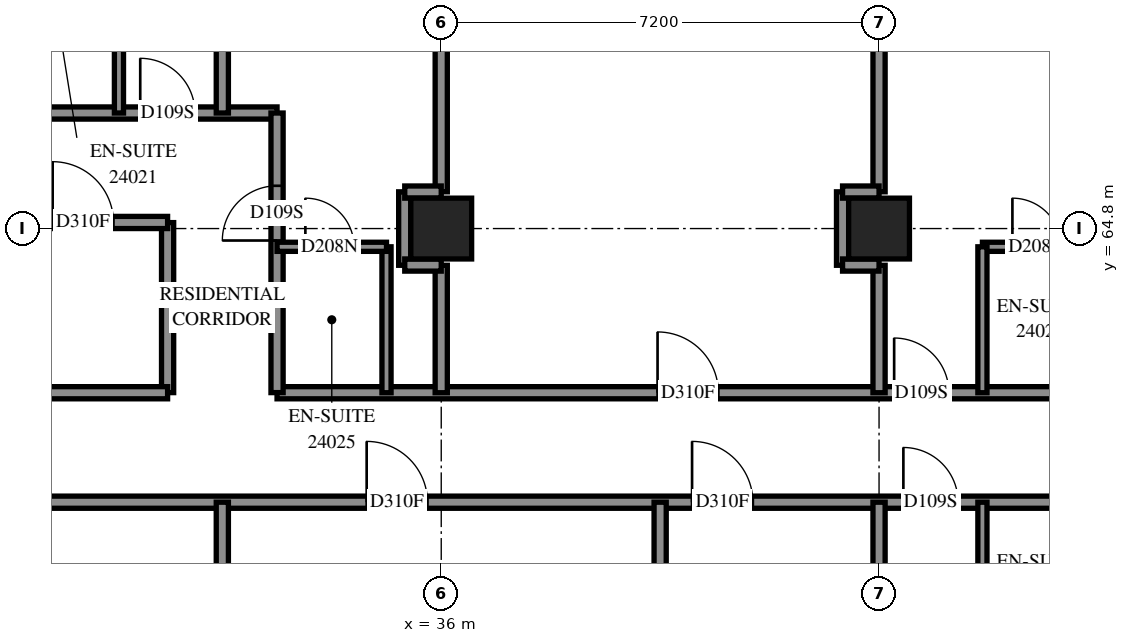
"""IFC4 building model, lengths in metres.
Left out: names, types, materials, properties, quantities, classifications, styles, units other than length and angle.
Written with IfcOpenShell. Run it as: python <this file> out.ifc"""

import sys

from ifc_helpers import new_model, si_unit, direction, frame, frame_2d, origin, origin_2d, place, context, subcontext, project, spatial, rectangle, extrude, element, fill, save


model = new_model("IFC4")
c1 = context("Model", 3, precision=1e-05, world=origin(), true_north=direction((0.0, 1.0)))
c2 = subcontext(c1, "Body", "Model", "MODEL_VIEW")
j1 = project(units=[si_unit("LENGTHUNIT", "METRE"), si_unit("PLANEANGLEUNIT", "RADIAN")], contexts=[c1])
p1 = place(None, origin())
s1 = spatial("IfcSite", under=j1, at=p1, CompositionType="ELEMENT")
p2 = place(p1, origin())
s2 = spatial("IfcBuilding", under=s1, at=p2, CompositionType="ELEMENT")
p3 = place(p2, frame((0.0, 0.0, 91.4)))
s3 = spatial("IfcBuildingStorey", under=s2, at=p3, CompositionType="ELEMENT", Elevation=91.4)
for number, where, z_axis, x_axis in (
    (1, (36.0, 64.8, 0.0), (0.0, 0.0, 1.0), (1.0, 0.0, 0.0)),
    (2, (43.2, 64.8, 0.0), (0.0, 0.0, 1.0), (1.0, 0.0, 0.0)),
):
    element("IfcColumn", number, at=place(p3, frame(where, z_axis=z_axis, x_axis=x_axis)), inside=s3, PredefinedType="COLUMN", context=c2, shape_type="SweptSolid", body=[
        extrude(rectangle(XDim=1.0, YDim=1.0, at=origin_2d()), origin(), (0.0, 0.0, 1.0), 3.1),
    ])
p4 = place(p3, frame((28.802, 60.3, 0.0), z_axis=(0.0, 0.0, 1.0), x_axis=(1.0, 0.0, 0.0)))
e3 = element("IfcWall", 3, at=p4, inside=s3, PredefinedType="PARTITIONING", context=c2, shape_type="SweptSolid", body=[
    extrude(rectangle(XDim=24.298, YDim=0.2, at=frame_2d((12.149, 0.0))), origin(), (0.0, 0.0, 1.0), 3.1),
])
p5 = place(p4, frame((5.972, 0.0, 0.0)))
e4 = element("IfcOpeningElement", 4, at=p5, cuts=e3, PredefinedType="OPENING", context=c2, shape_type="SweptSolid", body=[
    extrude(rectangle(XDim=1.0, YDim=2.1, at=frame_2d((0.5, 1.05))), frame((0.0, 0.11, 0.0), z_axis=(0.0, -1.0, 0.0), x_axis=(1.0, 0.0, 0.0)), (0.0, 0.0, 1.0), 0.22),
])
p6 = place(p4, frame((11.323, 0.0, 0.0)))
e5 = element("IfcOpeningElement", 5, at=p6, cuts=e3, PredefinedType="OPENING", context=c2, shape_type="SweptSolid", body=[
    extrude(rectangle(XDim=1.0, YDim=2.1, at=frame_2d((0.5, 1.05))), frame((0.0, 0.11, 0.0), z_axis=(0.0, -1.0, 0.0), x_axis=(1.0, 0.0, 0.0)), (0.0, 0.0, 1.0), 0.22),
])
p7 = place(p4, frame((14.798, 0.0, 0.0)))
e6 = element("IfcOpeningElement", 6, at=p7, cuts=e3, PredefinedType="OPENING", context=c2, shape_type="SweptSolid", body=[
    extrude(rectangle(XDim=0.9, YDim=2.1, at=frame_2d((0.45, 1.05))), frame((0.0, 0.11, 0.0), z_axis=(0.0, -1.0, 0.0), x_axis=(1.0, 0.0, 0.0)), (0.0, 0.0, 1.0), 0.22),
])
p8 = place(p4, frame((18.833, 0.0, 0.0)))
e7 = element("IfcOpeningElement", 7, at=p8, cuts=e3, PredefinedType="OPENING", context=c2, shape_type="SweptSolid", body=[
    extrude(rectangle(XDim=1.0, YDim=2.1, at=frame_2d((0.5, 1.05))), frame((0.0, 0.11, 0.0), z_axis=(0.0, -1.0, 0.0), x_axis=(1.0, 0.0, 0.0)), (0.0, 0.0, 1.0), 0.22),
])
p9 = place(p4, frame((23.151, 0.0, 0.0)))
e8 = element("IfcOpeningElement", 8, at=p9, cuts=e3, PredefinedType="OPENING", context=c2, shape_type="SweptSolid", body=[
    extrude(rectangle(XDim=1.0, YDim=2.1, at=frame_2d((0.5, 1.05))), frame((0.0, 0.11, 0.0), z_axis=(0.0, -1.0, 0.0), x_axis=(1.0, 0.0, 0.0)), (0.0, 0.0, 1.0), 0.22),
])
p10 = place(p3, frame((33.3, 62.1, 0.0), z_axis=(0.0, 0.0, 1.0), x_axis=(1.0, 0.0, 0.0)))
e9 = element("IfcWall", 9, at=p10, inside=s3, PredefinedType="PARTITIONING", context=c2, shape_type="SweptSolid", body=[
    extrude(rectangle(XDim=17.1, YDim=0.2, at=frame_2d((8.55, 0.0))), origin(), (0.0, 0.0, 1.0), 3.1),
])
p11 = place(p10, frame((6.258, 0.0, 0.0)))
e10 = element("IfcOpeningElement", 10, at=p11, cuts=e9, PredefinedType="OPENING", context=c2, shape_type="SweptSolid", body=[
    extrude(rectangle(XDim=1.0, YDim=2.1, at=frame_2d((0.5, 1.05))), frame((0.0, 0.11, 0.0), z_axis=(0.0, -1.0, 0.0), x_axis=(1.0, 0.0, 0.0)), (0.0, 0.0, 1.0), 0.22),
])
p12 = place(p10, frame((10.148, 0.0, 0.0)))
e11 = element("IfcOpeningElement", 11, at=p12, cuts=e9, PredefinedType="OPENING", context=c2, shape_type="SweptSolid", body=[
    extrude(rectangle(XDim=0.9, YDim=2.1, at=frame_2d((0.45, 1.05))), frame((0.0, 0.11, 0.0), z_axis=(0.0, -1.0, 0.0), x_axis=(1.0, 0.0, 0.0)), (0.0, 0.0, 1.0), 0.22),
])
p13 = place(p10, frame((15.729, 0.0, 0.0)))
e12 = element("IfcOpeningElement", 12, at=p13, cuts=e9, PredefinedType="OPENING", context=c2, shape_type="SweptSolid", body=[
    extrude(rectangle(XDim=0.9, YDim=2.1, at=frame_2d((0.45, 1.05))), frame((0.0, 0.11, 0.0), z_axis=(0.0, -1.0, 0.0), x_axis=(1.0, 0.0, 0.0)), (0.0, 0.0, 1.0), 0.22),
])
p14 = place(p3, frame((21.602, 66.7, 0.0), z_axis=(0.0, 0.0, 1.0), x_axis=(1.0, 0.0, 0.0)))
e13 = element("IfcWall", 13, at=p14, inside=s3, PredefinedType="PARTITIONING", context=c2, shape_type="SweptSolid", body=[
    extrude(rectangle(XDim=11.698, YDim=0.2, at=frame_2d((5.849, 0.0))), origin(), (0.0, 0.0, 1.0), 3.1),
])
p15 = place(p14, frame((1.79, 0.0, 0.0)))
e14 = element("IfcOpeningElement", 14, at=p15, cuts=e13, PredefinedType="OPENING", context=c2, shape_type="SweptSolid", body=[
    extrude(rectangle(XDim=1.0, YDim=2.1, at=frame_2d((0.5, 1.05))), frame((0.0, 0.11, 0.0), z_axis=(0.0, -1.0, 0.0), x_axis=(1.0, 0.0, 0.0)), (0.0, 0.0, 1.0), 0.22),
])
p16 = place(p14, frame((3.998, 0.0, 0.0)))
e15 = element("IfcOpeningElement", 15, at=p16, cuts=e13, PredefinedType="OPENING", context=c2, shape_type="SweptSolid", body=[
    extrude(rectangle(XDim=0.9, YDim=2.1, at=frame_2d((0.45, 1.05))), frame((0.0, 0.11, 0.0), z_axis=(0.0, -1.0, 0.0), x_axis=(1.0, 0.0, 0.0)), (0.0, 0.0, 1.0), 0.22),
])
p17 = place(p14, frame((9.448, 0.0, 0.0)))
e16 = element("IfcOpeningElement", 16, at=p17, cuts=e13, PredefinedType="OPENING", context=c2, shape_type="SweptSolid", body=[
    extrude(rectangle(XDim=0.9, YDim=2.1, at=frame_2d((0.45, 1.05))), frame((0.0, 0.11, 0.0), z_axis=(0.0, -1.0, 0.0), x_axis=(1.0, 0.0, 0.0)), (0.0, 0.0, 1.0), 0.22),
])
p18 = place(p3, frame((32.4, 66.7, 0.0), z_axis=(0.0, 0.0, 1.0), x_axis=(0.0, 1.0, 0.0)))
e17 = element("IfcWall", 17, at=p18, inside=s3, PredefinedType="PARTITIONING", context=c2, shape_type="SweptSolid", body=[
    extrude(rectangle(XDim=6.113, YDim=0.2, at=frame_2d((3.057, 0.0))), origin(), (0.0, 0.0, 1.0), 3.1),
])
for number, where, z_axis, x_axis in (
    (18, (36.0, 65.404, 0.0), (0.0, 0.0, 1.0), (0.0, 1.0, 0.0)),
    (19, (43.2, 65.404, 0.0), (0.0, 0.0, 1.0), (0.0, 1.0, 0.0)),
):
    element("IfcWall", number, at=place(p3, frame(where, z_axis=z_axis, x_axis=x_axis)), inside=s3, PredefinedType="PARTITIONING", context=c2, shape_type="SweptSolid", body=[
        extrude(rectangle(XDim=5.992, YDim=0.2, at=frame_2d((2.996, 0.0))), origin(), (0.0, 0.0, 1.0), 3.1),
    ])
p19 = place(p3, frame((33.3, 62.102, 0.0), z_axis=(0.0, 0.0, 1.0), x_axis=(0.0, 1.0, 0.0)))
e20 = element("IfcWall", 20, at=p19, inside=s3, PredefinedType="PARTITIONING", context=c2, shape_type="SweptSolid", body=[
    extrude(rectangle(XDim=4.598, YDim=0.2, at=frame_2d((2.299, 0.0))), origin(), (0.0, 0.0, 1.0), 3.1),
])
p20 = place(p19, frame((2.501, 0.0, 0.0)))
e21 = element("IfcOpeningElement", 21, at=p20, cuts=e20, PredefinedType="OPENING", context=c2, shape_type="SweptSolid", body=[
    extrude(rectangle(XDim=0.9, YDim=2.1, at=frame_2d((0.45, 1.05))), frame((0.0, 0.11, 0.0), z_axis=(0.0, -1.0, 0.0), x_axis=(1.0, 0.0, 0.0)), (0.0, 0.0, 1.0), 0.22),
])
for number, where, z_axis, x_axis in (
    (22, (32.4, 55.959, 0.0), (0.0, 0.0, 1.0), (0.0, 1.0, 0.0)),
    (23, (39.6, 55.959, 0.0), (0.0, 0.0, 1.0), (0.0, 1.0, 0.0)),
):
    element("IfcWall", number, at=place(p3, frame(where, z_axis=z_axis, x_axis=x_axis)), inside=s3, PredefinedType="PARTITIONING", context=c2, shape_type="SweptSolid", body=[
        extrude(rectangle(XDim=4.341, YDim=0.2, at=frame_2d((2.171, 0.0))), origin(), (0.0, 0.0, 1.0), 3.1),
    ])
p21 = place(p3, frame((44.9, 64.5, 0.0), z_axis=(0.0, 0.0, 1.0), x_axis=(1.0, 0.0, 0.0)))
e24 = element("IfcWall", 24, at=p21, inside=s3, PredefinedType="PARTITIONING", context=c2, shape_type="SweptSolid", body=[
    extrude(rectangle(XDim=3.8, YDim=0.15, at=frame_2d((1.9, 0.0))), origin(), (0.0, 0.0, 1.0), 3.1),
])
p22 = place(p21, frame((0.493, 0.0, 0.0)))
e25 = element("IfcOpeningElement", 25, at=p22, cuts=e24, PredefinedType="OPENING", context=c2, shape_type="SweptSolid", body=[
    extrude(rectangle(XDim=0.8, YDim=2.1, at=frame_2d((0.4, 1.05))), frame((0.0, 0.085, 0.0), z_axis=(0.0, -1.0, 0.0), x_axis=(1.0, 0.0, 0.0)), (0.0, 0.0, 1.0), 0.17),
])
p23 = place(p21, frame((2.507, 0.0, 0.0)))
e26 = element("IfcOpeningElement", 26, at=p23, cuts=e24, PredefinedType="OPENING", context=c2, shape_type="SweptSolid", body=[
    extrude(rectangle(XDim=0.8, YDim=2.1, at=frame_2d((0.4, 1.05))), frame((0.0, 0.085, 0.0), z_axis=(0.0, -1.0, 0.0), x_axis=(1.0, 0.0, 0.0)), (0.0, 0.0, 1.0), 0.17),
])
p24 = place(p3, frame((31.5, 62.102, 0.0), z_axis=(0.0, 0.0, 1.0), x_axis=(0.0, 1.0, 0.0)))
e27 = element("IfcWall", 27, at=p24, inside=s3, PredefinedType="PARTITIONING", context=c2, shape_type="SweptSolid", body=[
    extrude(rectangle(XDim=2.796, YDim=0.2, at=frame_2d((1.398, 0.0))), origin(), (0.0, 0.0, 1.0), 3.1),
])
p25 = place(p3, frame((28.802, 62.1, 0.0), z_axis=(0.0, 0.0, 1.0), x_axis=(1.0, 0.0, 0.0)))
e28 = element("IfcWall", 28, at=p25, inside=s3, PredefinedType="PARTITIONING", context=c2, shape_type="SweptSolid", body=[
    extrude(rectangle(XDim=2.698, YDim=0.2, at=frame_2d((1.349, 0.0))), origin(), (0.0, 0.0, 1.0), 3.1),
])
for number, where, z_axis, x_axis in (
    (29, (35.1, 62.1, 0.0), (0.0, 0.0, 1.0), (0.0, 1.0, 0.0)),
    (30, (44.9, 57.9, 0.0), (0.0, 0.0, 1.0), (0.0, 1.0, 0.0)),
    (31, (44.9, 62.1, 0.0), (0.0, 0.0, 1.0), (0.0, 1.0, 0.0)),
    (32, (30.7, 66.7, 0.0), (0.0, 0.0, 1.0), (0.0, 1.0, 0.0)),
):
    element("IfcWall", number, at=place(p3, frame(where, z_axis=z_axis, x_axis=x_axis)), inside=s3, PredefinedType="PARTITIONING", context=c2, shape_type="SweptSolid", body=[
        extrude(rectangle(XDim=2.4, YDim=0.15, at=frame_2d((1.2, 0.0))), origin(), (0.0, 0.0, 1.0), 3.1),
    ])
p26 = place(p3, frame((29.3, 64.9, 0.0), z_axis=(0.0, 0.0, 1.0), x_axis=(1.0, 0.0, 0.0)))
e33 = element("IfcWall", 33, at=p26, inside=s3, PredefinedType="PARTITIONING", context=c2, shape_type="SweptSolid", body=[
    extrude(rectangle(XDim=2.2, YDim=0.2, at=frame_2d((1.1, 0.0))), origin(), (0.0, 0.0, 1.0), 3.1),
])
p27 = place(p26, frame((0.31, 0.0, 0.0)))
e34 = element("IfcOpeningElement", 34, at=p27, cuts=e33, PredefinedType="OPENING", context=c2, shape_type="SweptSolid", body=[
    extrude(rectangle(XDim=1.0, YDim=2.1, at=frame_2d((0.5, 1.05))), frame((0.0, 0.11, 0.0), z_axis=(0.0, -1.0, 0.0), x_axis=(1.0, 0.0, 0.0)), (0.0, 0.0, 1.0), 0.22),
])
p28 = place(p3, frame((43.2, 58.1, 0.0), z_axis=(0.0, 0.0, 1.0), x_axis=(0.0, 1.0, 0.0)))
e35 = element("IfcWall", 35, at=p28, inside=s3, PredefinedType="PARTITIONING", context=c2, shape_type="SweptSolid", body=[
    extrude(rectangle(XDim=2.2, YDim=0.2, at=frame_2d((1.1, 0.0))), origin(), (0.0, 0.0, 1.0), 3.1),
])
for number, where, z_axis, x_axis in (
    (36, (36.0, 62.1, 0.0), (0.0, 0.0, 1.0), (0.0, 1.0, 0.0)),
    (37, (43.2, 62.1, 0.0), (0.0, 0.0, 1.0), (0.0, 1.0, 0.0)),
):
    element("IfcWall", number, at=place(p3, frame(where, z_axis=z_axis, x_axis=x_axis)), inside=s3, PredefinedType="PARTITIONING", context=c2, shape_type="SweptSolid", body=[
        extrude(rectangle(XDim=2.096, YDim=0.2, at=frame_2d((1.048, 0.0))), origin(), (0.0, 0.0, 1.0), 3.1),
    ])
p29 = place(p3, frame((33.3, 64.5, 0.0), z_axis=(0.0, 0.0, 1.0), x_axis=(1.0, 0.0, 0.0)))
e38 = element("IfcWall", 38, at=p29, inside=s3, PredefinedType="PARTITIONING", context=c2, shape_type="SweptSolid", body=[
    extrude(rectangle(XDim=1.8, YDim=0.15, at=frame_2d((0.9, 0.0))), origin(), (0.0, 0.0, 1.0), 3.1),
])
p30 = place(p29, frame((0.466, 0.0, 0.0)))
e39 = element("IfcOpeningElement", 39, at=p30, cuts=e38, PredefinedType="OPENING", context=c2, shape_type="SweptSolid", body=[
    extrude(rectangle(XDim=0.8, YDim=2.1, at=frame_2d((0.4, 1.05))), frame((0.0, 0.085, 0.0), z_axis=(0.0, -1.0, 0.0), x_axis=(1.0, 0.0, 0.0)), (0.0, 0.0, 1.0), 0.17),
])
for number, where, z_axis, x_axis in (
    (40, (35.4, 64.196, 0.0), (0.0, 0.0, 1.0), (0.0, 1.0, 0.0)),
    (41, (42.6, 64.196, 0.0), (0.0, 0.0, 1.0), (0.0, 1.0, 0.0)),
):
    element("IfcWall", number, at=place(p3, frame(where, z_axis=z_axis, x_axis=x_axis)), inside=s3, PredefinedType="PARTITIONING", context=c2, shape_type="SweptSolid", body=[
        extrude(rectangle(XDim=1.208, YDim=0.2, at=frame_2d((0.604, 0.0))), origin(), (0.0, 0.0, 1.0), 3.1),
    ])
for number, where, z_axis, x_axis in (
    (42, (35.4, 65.4, 0.0), (0.0, 0.0, 1.0), (1.0, 0.0, 0.0)),
    (43, (42.6, 65.4, 0.0), (0.0, 0.0, 1.0), (1.0, 0.0, 0.0)),
    (44, (35.4, 64.2, 0.0), (0.0, 0.0, 1.0), (1.0, 0.0, 0.0)),
    (45, (42.6, 64.2, 0.0), (0.0, 0.0, 1.0), (1.0, 0.0, 0.0)),
):
    element("IfcWall", number, at=place(p3, frame(where, z_axis=z_axis, x_axis=x_axis)), inside=s3, PredefinedType="PARTITIONING", context=c2, shape_type="SweptSolid", body=[
        extrude(rectangle(XDim=0.6, YDim=0.2, at=frame_2d((0.3, 0.0))), origin(), (0.0, 0.0, 1.0), 3.1),
    ])
p31 = place(p17, origin())
e46 = element("IfcDoor", 46, at=p31, inside=s3, OperationType="SINGLE_SWING_RIGHT", PredefinedType="DOOR", context=c2, shape_type="SweptSolid", body=[
    extrude(rectangle(XDim=0.9, YDim=2.1, at=frame_2d((0.45, 1.05))), frame((0.0, 0.025, 0.0), z_axis=(0.0, -1.0, 0.0), x_axis=(1.0, 0.0, 0.0)), (0.0, 0.0, 1.0), 0.05),
])
fill(e16, e46)
p32 = place(p27, origin())
e47 = element("IfcDoor", 47, at=p32, inside=s3, OperationType="SINGLE_SWING_RIGHT", PredefinedType="DOOR", context=c2, shape_type="SweptSolid", body=[
    extrude(rectangle(XDim=1.0, YDim=2.1, at=frame_2d((0.5, 1.05))), frame((0.0, 0.025, 0.0), z_axis=(0.0, -1.0, 0.0), x_axis=(1.0, 0.0, 0.0)), (0.0, 0.0, 1.0), 0.05),
])
fill(e34, e47)
p33 = place(p5, origin())
e48 = element("IfcDoor", 48, at=p33, inside=s3, OperationType="SINGLE_SWING_RIGHT", PredefinedType="DOOR", context=c2, shape_type="SweptSolid", body=[
    extrude(rectangle(XDim=1.0, YDim=2.1, at=frame_2d((0.5, 1.05))), frame((0.0, 0.025, 0.0), z_axis=(0.0, -1.0, 0.0), x_axis=(1.0, 0.0, 0.0)), (0.0, 0.0, 1.0), 0.05),
])
fill(e4, e48)
p34 = place(p20, origin())
e49 = element("IfcDoor", 49, at=p34, inside=s3, OperationType="SINGLE_SWING_LEFT", PredefinedType="DOOR", context=c2, shape_type="SweptSolid", body=[
    extrude(rectangle(XDim=0.9, YDim=2.1, at=frame_2d((0.45, 1.05))), frame((0.0, 0.025, 0.0), z_axis=(0.0, -1.0, 0.0), x_axis=(1.0, 0.0, 0.0)), (0.0, 0.0, 1.0), 0.05),
])
fill(e21, e49)
p35 = place(p30, origin())
e50 = element("IfcDoor", 50, at=p35, inside=s3, OperationType="SINGLE_SWING_RIGHT", PredefinedType="DOOR", context=c2, shape_type="SweptSolid", body=[
    extrude(rectangle(XDim=0.8, YDim=2.1, at=frame_2d((0.4, 1.05))), frame((0.0, 0.025, 0.0), z_axis=(0.0, -1.0, 0.0), x_axis=(1.0, 0.0, 0.0)), (0.0, 0.0, 1.0), 0.05),
])
fill(e39, e50)
p36 = place(p11, origin())
e51 = element("IfcDoor", 51, at=p36, inside=s3, OperationType="SINGLE_SWING_RIGHT", PredefinedType="DOOR", context=c2, shape_type="SweptSolid", body=[
    extrude(rectangle(XDim=1.0, YDim=2.1, at=frame_2d((0.5, 1.05))), frame((0.0, 0.025, 0.0), z_axis=(0.0, -1.0, 0.0), x_axis=(1.0, 0.0, 0.0)), (0.0, 0.0, 1.0), 0.05),
])
fill(e10, e51)
p37 = place(p12, origin())
e52 = element("IfcDoor", 52, at=p37, inside=s3, OperationType="SINGLE_SWING_RIGHT", PredefinedType="DOOR", context=c2, shape_type="SweptSolid", body=[
    extrude(rectangle(XDim=0.9, YDim=2.1, at=frame_2d((0.45, 1.05))), frame((0.0, 0.025, 0.0), z_axis=(0.0, -1.0, 0.0), x_axis=(1.0, 0.0, 0.0)), (0.0, 0.0, 1.0), 0.05),
])
fill(e11, e52)
p38 = place(p22, origin())
e53 = element("IfcDoor", 53, at=p38, inside=s3, OperationType="SINGLE_SWING_RIGHT", PredefinedType="DOOR", context=c2, shape_type="SweptSolid", body=[
    extrude(rectangle(XDim=0.8, YDim=2.1, at=frame_2d((0.4, 1.05))), frame((0.0, 0.025, 0.0), z_axis=(0.0, -1.0, 0.0), x_axis=(1.0, 0.0, 0.0)), (0.0, 0.0, 1.0), 0.05),
])
fill(e25, e53)
p39 = place(p6, origin())
e54 = element("IfcDoor", 54, at=p39, inside=s3, OperationType="SINGLE_SWING_RIGHT", PredefinedType="DOOR", context=c2, shape_type="SweptSolid", body=[
    extrude(rectangle(XDim=1.0, YDim=2.1, at=frame_2d((0.5, 1.05))), frame((0.0, 0.025, 0.0), z_axis=(0.0, -1.0, 0.0), x_axis=(1.0, 0.0, 0.0)), (0.0, 0.0, 1.0), 0.05),
])
fill(e5, e54)
p40 = place(p7, origin())
e55 = element("IfcDoor", 55, at=p40, inside=s3, OperationType="SINGLE_SWING_LEFT", PredefinedType="DOOR", context=c2, shape_type="SweptSolid", body=[
    extrude(rectangle(XDim=0.9, YDim=2.1, at=frame_2d((0.45, 1.05))), frame((0.0, 0.025, 0.0), z_axis=(0.0, -1.0, 0.0), x_axis=(1.0, 0.0, 0.0)), (0.0, 0.0, 1.0), 0.05),
])
fill(e6, e55)
save(model, sys.argv[1])
